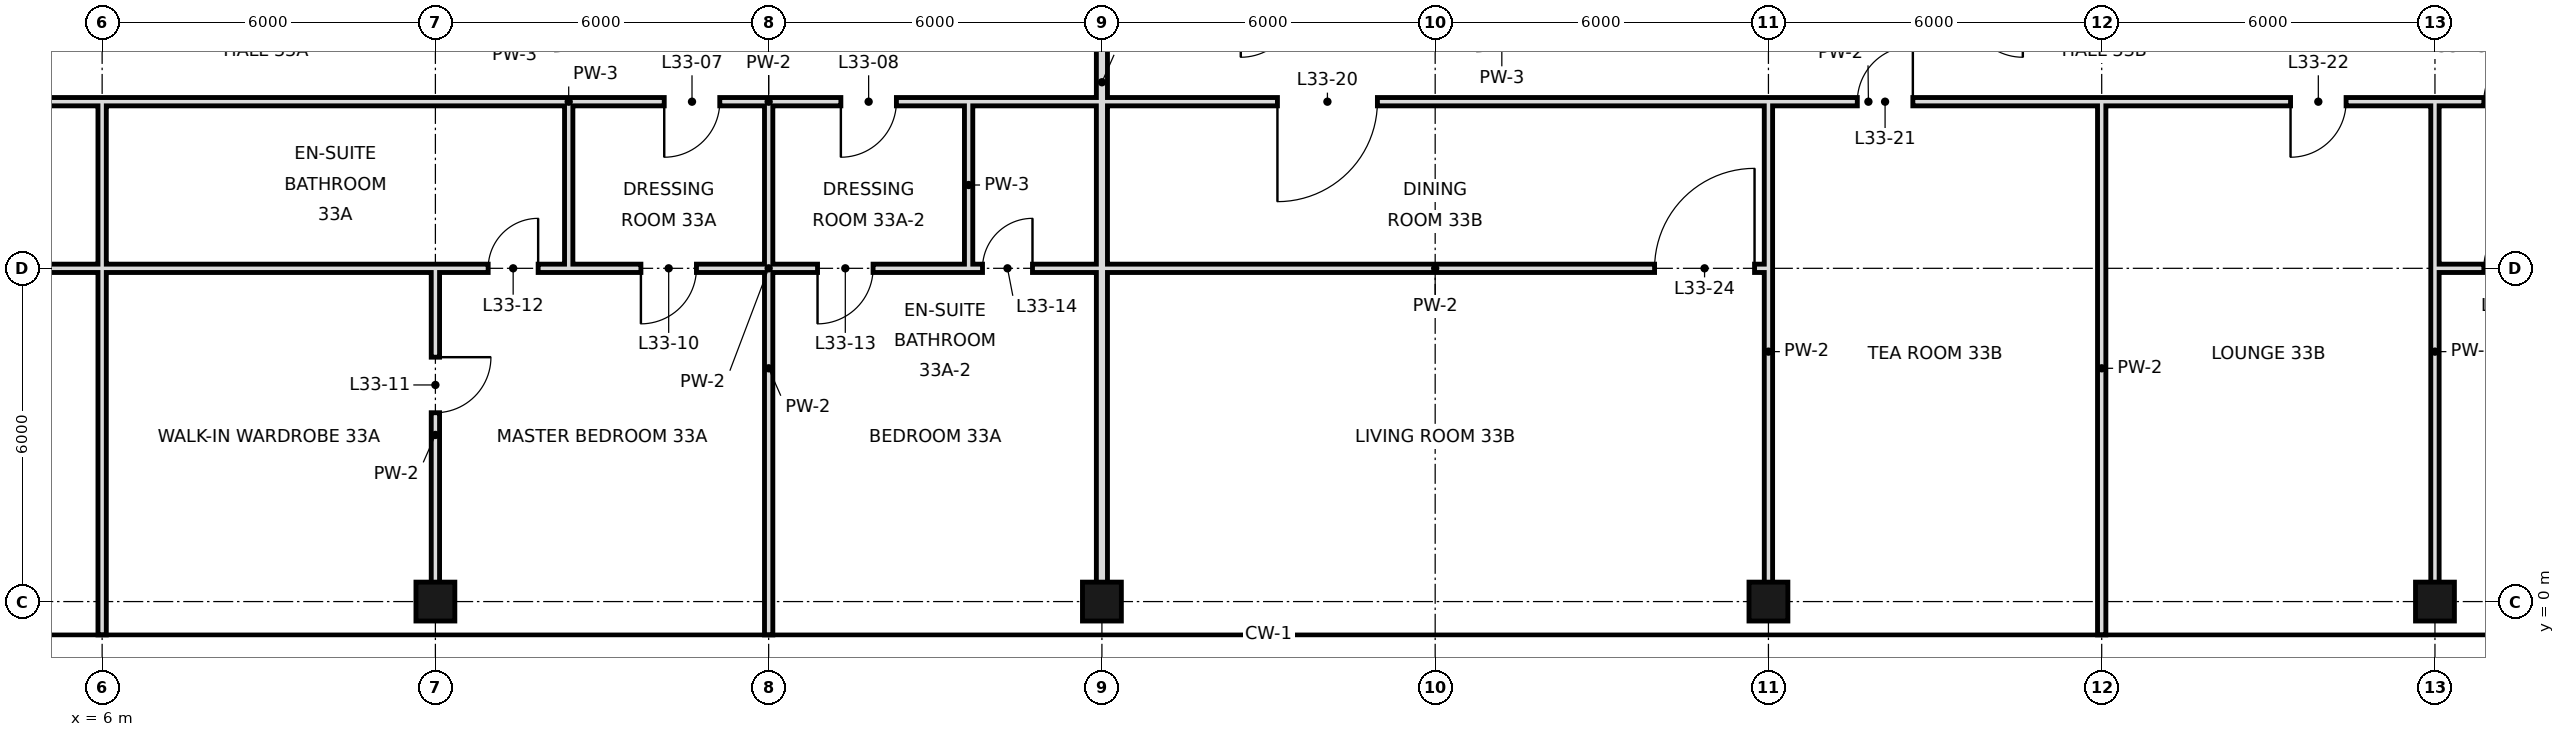
"""IFC4 building model, lengths in metres.
Left out: names, types, materials, properties, quantities, classifications, styles, units other than length and angle.
Written with IfcOpenShell. Run it as: python <this file> out.ifc"""

import sys

from ifc_helpers import new_model, si_unit, direction, frame, frame_2d, origin, origin_2d, place, context, subcontext, project, spatial, rectangle, hollow_rectangle, extrude, element, fill, save


model = new_model("IFC4")
c1 = context("Model", 3, precision=1e-05, world=origin(), true_north=direction((0.0, 1.0)))
c2 = subcontext(c1, "Body", "Model", "MODEL_VIEW")
j1 = project(units=[si_unit("LENGTHUNIT", "METRE"), si_unit("PLANEANGLEUNIT", "RADIAN")], contexts=[c1])
p1 = place(None, origin())
s1 = spatial("IfcSite", under=j1, at=p1, CompositionType="ELEMENT")
p2 = place(p1, origin())
s2 = spatial("IfcBuilding", under=s1, at=p2, CompositionType="ELEMENT")
p3 = place(p2, frame((0.0, 0.0, 147.4)))
s3 = spatial("IfcBuildingStorey", under=s2, at=p3, CompositionType="ELEMENT", Elevation=147.4)
for number, where, z_axis, x_axis in (
    (1, (12.0, 0.0, 0.0), (0.0, 0.0, 1.0), (1.0, 0.0, 0.0)),
    (2, (24.0, 0.0, 0.0), (0.0, 0.0, 1.0), (1.0, 0.0, 0.0)),
    (3, (36.0, 0.0, 0.0), (0.0, 0.0, 1.0), (1.0, 0.0, 0.0)),
    (4, (48.0, 0.0, 0.0), (0.0, 0.0, 1.0), (1.0, 0.0, 0.0)),
):
    element("IfcColumn", number, at=place(p3, frame(where, z_axis=z_axis, x_axis=x_axis)), inside=s3, PredefinedType="COLUMN", context=c2, shape_type="SweptSolid", body=[
        extrude(hollow_rectangle(XDim=0.7, YDim=0.7, WallThickness=0.036, at=origin_2d()), origin(), (0.0, 0.0, 1.0), 3.6),
    ])
p4 = place(p3, frame((12.0, 0.0, 0.0), z_axis=(0.0, 0.0, 1.0), x_axis=(0.0, 1.0, 0.0)))
e5 = element("IfcWall", 5, at=p4, inside=s3, PredefinedType="PARTITIONING", context=c2, shape_type="SweptSolid", body=[
    extrude(rectangle(XDim=6.0, YDim=0.15, at=frame_2d((3.0, 0.0))), origin(), (0.0, 0.0, 1.0), 2.72),
])
p5 = place(p4, frame((3.4, 0.0, 0.0)))
e6 = element("IfcOpeningElement", 6, at=p5, cuts=e5, PredefinedType="OPENING", context=c2, shape_type="SweptSolid", body=[
    extrude(rectangle(XDim=1.0, YDim=2.4, at=frame_2d((0.5, 1.2))), frame((0.0, 0.085, 0.0), z_axis=(0.0, -1.0, 0.0), x_axis=(1.0, 0.0, 0.0)), (0.0, 0.0, 1.0), 0.17),
])
p6 = place(p3, frame((14.4, 6.0, 0.0), z_axis=(0.0, 0.0, 1.0), x_axis=(0.0, 1.0, 0.0)))
e7 = element("IfcWall", 7, at=p6, inside=s3, PredefinedType="PARTITIONING", context=c2, shape_type="SweptSolid", body=[
    extrude(rectangle(XDim=3.0, YDim=0.15, at=frame_2d((1.5, 0.0))), origin(), (0.0, 0.0, 1.0), 3.42),
])
p7 = place(p3, frame((18.0, -0.6, 0.0), z_axis=(0.0, 0.0, 1.0), x_axis=(0.0, 1.0, 0.0)))
e8 = element("IfcWall", 8, at=p7, inside=s3, PredefinedType="PARTITIONING", context=c2, shape_type="SweptSolid", body=[
    extrude(rectangle(XDim=9.6, YDim=0.15, at=frame_2d((4.8, 0.0))), origin(), (0.0, 0.0, 1.0), 2.72),
])
p8 = place(p3, frame((21.6, 6.0, 0.0), z_axis=(0.0, 0.0, 1.0), x_axis=(0.0, 1.0, 0.0)))
e9 = element("IfcWall", 9, at=p8, inside=s3, PredefinedType="PARTITIONING", context=c2, shape_type="SweptSolid", body=[
    extrude(rectangle(XDim=3.0, YDim=0.15, at=frame_2d((1.5, 0.0))), origin(), (0.0, 0.0, 1.0), 3.42),
])
p9 = place(p3, frame((24.0, 0.0, 0.0), z_axis=(0.0, 0.0, 1.0), x_axis=(0.0, 1.0, 0.0)))
e10 = element("IfcWall", 10, at=p9, inside=s3, PredefinedType="SOLIDWALL", context=c2, shape_type="SweptSolid", body=[
    extrude(rectangle(XDim=18.7, YDim=0.2, at=frame_2d((9.35, 0.0))), origin(), (0.0, 0.0, 1.0), 2.72),
])
p10 = place(p3, frame((36.0, 0.0, 0.0), z_axis=(0.0, 0.0, 1.0), x_axis=(0.0, 1.0, 0.0)))
e11 = element("IfcWall", 11, at=p10, inside=s3, PredefinedType="PARTITIONING", context=c2, shape_type="SweptSolid", body=[
    extrude(rectangle(XDim=9.0, YDim=0.15, at=frame_2d((4.5, 0.0))), origin(), (0.0, 0.0, 1.0), 2.72),
])
p11 = place(p3, frame((42.0, -0.6, 0.0), z_axis=(0.0, 0.0, 1.0), x_axis=(0.0, 1.0, 0.0)))
e12 = element("IfcWall", 12, at=p11, inside=s3, PredefinedType="PARTITIONING", context=c2, shape_type="SweptSolid", body=[
    extrude(rectangle(XDim=9.6, YDim=0.15, at=frame_2d((4.8, 0.0))), origin(), (0.0, 0.0, 1.0), 2.72),
])
p12 = place(p3, frame((48.0, 0.0, 0.0), z_axis=(0.0, 0.0, 1.0), x_axis=(0.0, 1.0, 0.0)))
e13 = element("IfcWall", 13, at=p12, inside=s3, PredefinedType="PARTITIONING", context=c2, shape_type="SweptSolid", body=[
    extrude(rectangle(XDim=9.0, YDim=0.15, at=frame_2d((4.5, 0.0))), origin(), (0.0, 0.0, 1.0), 2.72),
])
p13 = place(p3, frame((6.0, -0.6, 0.0), z_axis=(0.0, 0.0, 1.0), x_axis=(0.0, 1.0, 0.0)))
e14 = element("IfcWall", 14, at=p13, inside=s3, PredefinedType="PARTITIONING", context=c2, shape_type="SweptSolid", body=[
    extrude(rectangle(XDim=6.6, YDim=0.15, at=frame_2d((3.3, 0.0))), origin(), (0.0, 0.0, 1.0), 2.72),
])
p14 = place(p3, frame((6.0, 6.0, 0.0), z_axis=(0.0, 0.0, 1.0), x_axis=(0.0, 1.0, 0.0)))
e15 = element("IfcWall", 15, at=p14, inside=s3, PredefinedType="PARTITIONING", context=c2, shape_type="SweptSolid", body=[
    extrude(rectangle(XDim=3.0, YDim=0.15, at=frame_2d((1.5, 0.0))), origin(), (0.0, 0.0, 1.0), 2.72),
])
p15 = place(p3, frame((-6.0, 6.0, 0.0), z_axis=(0.0, 0.0, 1.0), x_axis=(1.0, 0.0, 0.0)))
e16 = element("IfcWall", 16, at=p15, inside=s3, PredefinedType="PARTITIONING", context=c2, shape_type="SweptSolid", body=[
    extrude(rectangle(XDim=12.0, YDim=0.15, at=frame_2d((6.0, 0.0))), origin(), (0.0, 0.0, 1.0), 2.97),
])
p16 = place(p15, frame((7.04, 0.0, 0.0)))
e17 = element("IfcOpeningElement", 17, at=p16, cuts=e16, PredefinedType="OPENING", context=c2, shape_type="SweptSolid", body=[
    extrude(rectangle(XDim=1.8, YDim=2.4, at=frame_2d((0.9, 1.2))), frame((0.0, 0.085, 0.0), z_axis=(0.0, -1.0, 0.0), x_axis=(1.0, 0.0, 0.0)), (0.0, 0.0, 1.0), 0.17),
])
p17 = place(p3, frame((14.4, 6.0, 0.0), z_axis=(0.0, 0.0, 1.0), x_axis=(1.0, 0.0, 0.0)))
e18 = element("IfcWall", 18, at=p17, inside=s3, PredefinedType="PARTITIONING", context=c2, shape_type="SweptSolid", body=[
    extrude(rectangle(XDim=7.2, YDim=0.15, at=frame_2d((3.6, 0.0))), origin(), (0.0, 0.0, 1.0), 2.97),
])
p18 = place(p17, frame((1.3, 0.0, 0.0)))
e19 = element("IfcOpeningElement", 19, at=p18, cuts=e18, PredefinedType="OPENING", context=c2, shape_type="SweptSolid", body=[
    extrude(rectangle(XDim=1.0, YDim=2.4, at=frame_2d((0.5, 1.2))), frame((0.0, 0.085, 0.0), z_axis=(0.0, -1.0, 0.0), x_axis=(1.0, 0.0, 0.0)), (0.0, 0.0, 1.0), 0.17),
])
p19 = place(p17, frame((4.48, 0.0, 0.0)))
e20 = element("IfcOpeningElement", 20, at=p19, cuts=e18, PredefinedType="OPENING", context=c2, shape_type="SweptSolid", body=[
    extrude(rectangle(XDim=1.0, YDim=2.4, at=frame_2d((0.5, 1.2))), frame((0.0, 0.085, 0.0), z_axis=(0.0, -1.0, 0.0), x_axis=(1.0, 0.0, 0.0)), (0.0, 0.0, 1.0), 0.17),
])
p20 = place(p3, frame((24.0, 6.0, 0.0), z_axis=(0.0, 0.0, 1.0), x_axis=(1.0, 0.0, 0.0)))
e21 = element("IfcWall", 21, at=p20, inside=s3, PredefinedType="PARTITIONING", context=c2, shape_type="SweptSolid", body=[
    extrude(rectangle(XDim=12.0, YDim=0.15, at=frame_2d((6.0, 0.0))), origin(), (0.0, 0.0, 1.0), 2.97),
])
p21 = place(p20, frame((9.95, 0.0, 0.0)))
e22 = element("IfcOpeningElement", 22, at=p21, cuts=e21, PredefinedType="OPENING", context=c2, shape_type="SweptSolid", body=[
    extrude(rectangle(XDim=1.8, YDim=2.4, at=frame_2d((0.9, 1.2))), frame((0.0, 0.085, 0.0), z_axis=(0.0, -1.0, 0.0), x_axis=(1.0, 0.0, 0.0)), (0.0, 0.0, 1.0), 0.17),
])
p22 = place(p3, frame((48.0, 6.0, 0.0), z_axis=(0.0, 0.0, 1.0), x_axis=(1.0, 0.0, 0.0)))
e23 = element("IfcWall", 23, at=p22, inside=s3, PredefinedType="PARTITIONING", context=c2, shape_type="SweptSolid", body=[
    extrude(rectangle(XDim=3.6, YDim=0.15, at=frame_2d((1.8, 0.0))), origin(), (0.0, 0.0, 1.0), 2.72),
])
p23 = place(p22, frame((0.88, 0.0, 0.0)))
e24 = element("IfcOpeningElement", 24, at=p23, cuts=e23, PredefinedType="OPENING", context=c2, shape_type="SweptSolid", body=[
    extrude(rectangle(XDim=1.0, YDim=2.4, at=frame_2d((0.5, 1.2))), frame((0.0, 0.085, 0.0), z_axis=(0.0, -1.0, 0.0), x_axis=(1.0, 0.0, 0.0)), (0.0, 0.0, 1.0), 0.17),
])
p24 = place(p3, frame((6.0, 6.0, 0.0), z_axis=(0.0, 0.0, 1.0), x_axis=(1.0, 0.0, 0.0)))
e25 = element("IfcWall", 25, at=p24, inside=s3, PredefinedType="PARTITIONING", context=c2, shape_type="SweptSolid", body=[
    extrude(rectangle(XDim=8.4, YDim=0.15, at=frame_2d((4.2, 0.0))), origin(), (0.0, 0.0, 1.0), 2.97),
])
p25 = place(p24, frame((6.95, 0.0, 0.0)))
e26 = element("IfcOpeningElement", 26, at=p25, cuts=e25, PredefinedType="OPENING", context=c2, shape_type="SweptSolid", body=[
    extrude(rectangle(XDim=0.9, YDim=2.4, at=frame_2d((0.45, 1.2))), frame((0.0, 0.085, 0.0), z_axis=(0.0, -1.0, 0.0), x_axis=(1.0, 0.0, 0.0)), (0.0, 0.0, 1.0), 0.17),
])
p26 = place(p3, frame((21.6, 6.0, 0.0), z_axis=(0.0, 0.0, 1.0), x_axis=(1.0, 0.0, 0.0)))
e27 = element("IfcWall", 27, at=p26, inside=s3, PredefinedType="PARTITIONING", context=c2, shape_type="SweptSolid", body=[
    extrude(rectangle(XDim=2.4, YDim=0.15, at=frame_2d((1.2, 0.0))), origin(), (0.0, 0.0, 1.0), 2.97),
])
p27 = place(p26, frame((0.25, 0.0, 0.0)))
e28 = element("IfcOpeningElement", 28, at=p27, cuts=e27, PredefinedType="OPENING", context=c2, shape_type="SweptSolid", body=[
    extrude(rectangle(XDim=0.9, YDim=2.4, at=frame_2d((0.45, 1.2))), frame((0.0, 0.085, 0.0), z_axis=(0.0, -1.0, 0.0), x_axis=(1.0, 0.0, 0.0)), (0.0, 0.0, 1.0), 0.17),
])
p28 = place(p3, frame((-6.6, 9.0, 0.0), z_axis=(0.0, 0.0, 1.0), x_axis=(1.0, 0.0, 0.0)))
e29 = element("IfcWall", 29, at=p28, inside=s3, PredefinedType="PARTITIONING", context=c2, shape_type="SweptSolid", body=[
    extrude(rectangle(XDim=12.6, YDim=0.15, at=frame_2d((6.3, 0.0))), origin(), (0.0, 0.0, 1.0), 3.42),
])
p29 = place(p28, frame((7.64, 0.0, 0.0)))
e30 = element("IfcOpeningElement", 30, at=p29, cuts=e29, PredefinedType="OPENING", context=c2, shape_type="SweptSolid", body=[
    extrude(rectangle(XDim=1.8, YDim=2.4, at=frame_2d((0.9, 1.2))), frame((0.0, 0.085, 0.0), z_axis=(0.0, -1.0, 0.0), x_axis=(1.0, 0.0, 0.0)), (0.0, 0.0, 1.0), 0.17),
])
p30 = place(p3, frame((14.4, 9.0, 0.0), z_axis=(0.0, 0.0, 1.0), x_axis=(1.0, 0.0, 0.0)))
e31 = element("IfcWall", 31, at=p30, inside=s3, PredefinedType="PARTITIONING", context=c2, shape_type="SweptSolid", body=[
    extrude(rectangle(XDim=7.2, YDim=0.15, at=frame_2d((3.6, 0.0))), origin(), (0.0, 0.0, 1.0), 3.42),
])
p31 = place(p30, frame((1.72, 0.0, 0.0)))
e32 = element("IfcOpeningElement", 32, at=p31, cuts=e31, PredefinedType="OPENING", context=c2, shape_type="SweptSolid", body=[
    extrude(rectangle(XDim=1.0, YDim=2.4, at=frame_2d((0.5, 1.2))), frame((0.0, 0.085, 0.0), z_axis=(0.0, -1.0, 0.0), x_axis=(1.0, 0.0, 0.0)), (0.0, 0.0, 1.0), 0.17),
])
p32 = place(p30, frame((4.9, 0.0, 0.0)))
e33 = element("IfcOpeningElement", 33, at=p32, cuts=e31, PredefinedType="OPENING", context=c2, shape_type="SweptSolid", body=[
    extrude(rectangle(XDim=1.0, YDim=2.4, at=frame_2d((0.5, 1.2))), frame((0.0, 0.085, 0.0), z_axis=(0.0, -1.0, 0.0), x_axis=(1.0, 0.0, 0.0)), (0.0, 0.0, 1.0), 0.17),
])
p33 = place(p3, frame((24.0, 9.0, 0.0), z_axis=(0.0, 0.0, 1.0), x_axis=(1.0, 0.0, 0.0)))
e34 = element("IfcWall", 34, at=p33, inside=s3, PredefinedType="PARTITIONING", context=c2, shape_type="SweptSolid", body=[
    extrude(rectangle(XDim=27.6, YDim=0.15, at=frame_2d((13.8, 0.0))), origin(), (0.0, 0.0, 1.0), 3.42),
])
p34 = place(p33, frame((3.16, 0.0, 0.0)))
e35 = element("IfcOpeningElement", 35, at=p34, cuts=e34, PredefinedType="OPENING", context=c2, shape_type="SweptSolid", body=[
    extrude(rectangle(XDim=1.8, YDim=2.4, at=frame_2d((0.9, 1.2))), frame((0.0, 0.085, 0.0), z_axis=(0.0, -1.0, 0.0), x_axis=(1.0, 0.0, 0.0)), (0.0, 0.0, 1.0), 0.17),
])
p35 = place(p33, frame((13.6, 0.0, 0.0)))
e36 = element("IfcOpeningElement", 36, at=p35, cuts=e34, PredefinedType="OPENING", context=c2, shape_type="SweptSolid", body=[
    extrude(rectangle(XDim=1.0, YDim=2.4, at=frame_2d((0.5, 1.2))), frame((0.0, 0.085, 0.0), z_axis=(0.0, -1.0, 0.0), x_axis=(1.0, 0.0, 0.0)), (0.0, 0.0, 1.0), 0.17),
])
p36 = place(p33, frame((21.4, 0.0, 0.0)))
e37 = element("IfcOpeningElement", 37, at=p36, cuts=e34, PredefinedType="OPENING", context=c2, shape_type="SweptSolid", body=[
    extrude(rectangle(XDim=1.0, YDim=2.4, at=frame_2d((0.5, 1.2))), frame((0.0, 0.085, 0.0), z_axis=(0.0, -1.0, 0.0), x_axis=(1.0, 0.0, 0.0)), (0.0, 0.0, 1.0), 0.17),
])
p37 = place(p33, frame((24.88, 0.0, 0.0)))
e38 = element("IfcOpeningElement", 38, at=p37, cuts=e34, PredefinedType="OPENING", context=c2, shape_type="SweptSolid", body=[
    extrude(rectangle(XDim=1.0, YDim=2.4, at=frame_2d((0.5, 1.2))), frame((0.0, 0.085, 0.0), z_axis=(0.0, -1.0, 0.0), x_axis=(1.0, 0.0, 0.0)), (0.0, 0.0, 1.0), 0.17),
])
p38 = place(p3, frame((6.0, 9.0, 0.0), z_axis=(0.0, 0.0, 1.0), x_axis=(1.0, 0.0, 0.0)))
e39 = element("IfcWall", 39, at=p38, inside=s3, PredefinedType="PARTITIONING", context=c2, shape_type="SweptSolid", body=[
    extrude(rectangle(XDim=8.4, YDim=0.15, at=frame_2d((4.2, 0.0))), origin(), (0.0, 0.0, 1.0), 3.42),
])
p39 = place(p3, frame((21.6, 9.0, 0.0), z_axis=(0.0, 0.0, 1.0), x_axis=(1.0, 0.0, 0.0)))
e40 = element("IfcWall", 40, at=p39, inside=s3, PredefinedType="PARTITIONING", context=c2, shape_type="SweptSolid", body=[
    extrude(rectangle(XDim=2.4, YDim=0.15, at=frame_2d((1.2, 0.0))), origin(), (0.0, 0.0, 1.0), 3.42),
])
p40 = place(p31, frame((1.0, 0.0, 0.0), z_axis=(0.0, 0.0, 1.0), x_axis=(-1.0, 0.0, 0.0)))
e41 = element("IfcDoor", 41, at=p40, inside=s3, OperationType="SINGLE_SWING_RIGHT", PredefinedType="DOOR", context=c2, shape_type="SweptSolid", body=[
    extrude(rectangle(XDim=1.0, YDim=2.4, at=frame_2d((0.5, 1.2))), frame((0.0, 0.025, 0.0), z_axis=(0.0, -1.0, 0.0), x_axis=(1.0, 0.0, 0.0)), (0.0, 0.0, 1.0), 0.05),
])
fill(e32, e41)
p41 = place(p32, frame((1.0, 0.0, 0.0), z_axis=(0.0, 0.0, 1.0), x_axis=(-1.0, 0.0, 0.0)))
e42 = element("IfcDoor", 42, at=p41, inside=s3, OperationType="SINGLE_SWING_RIGHT", PredefinedType="DOOR", context=c2, shape_type="SweptSolid", body=[
    extrude(rectangle(XDim=1.0, YDim=2.4, at=frame_2d((0.5, 1.2))), frame((0.0, 0.025, 0.0), z_axis=(0.0, -1.0, 0.0), x_axis=(1.0, 0.0, 0.0)), (0.0, 0.0, 1.0), 0.05),
])
fill(e33, e42)
p42 = place(p18, frame((1.0, 0.0, 0.0), z_axis=(0.0, 0.0, 1.0), x_axis=(-1.0, 0.0, 0.0)))
e43 = element("IfcDoor", 43, at=p42, inside=s3, OperationType="SINGLE_SWING_RIGHT", PredefinedType="DOOR", context=c2, shape_type="SweptSolid", body=[
    extrude(rectangle(XDim=1.0, YDim=2.4, at=frame_2d((0.5, 1.2))), frame((0.0, 0.025, 0.0), z_axis=(0.0, -1.0, 0.0), x_axis=(1.0, 0.0, 0.0)), (0.0, 0.0, 1.0), 0.05),
])
fill(e19, e43)
p43 = place(p5, origin())
e44 = element("IfcDoor", 44, at=p43, inside=s3, OperationType="SINGLE_SWING_RIGHT", PredefinedType="DOOR", context=c2, shape_type="SweptSolid", body=[
    extrude(rectangle(XDim=1.0, YDim=2.4, at=frame_2d((0.5, 1.2))), frame((0.0, 0.025, 0.0), z_axis=(0.0, -1.0, 0.0), x_axis=(1.0, 0.0, 0.0)), (0.0, 0.0, 1.0), 0.05),
])
fill(e6, e44)
p44 = place(p25, frame((0.9, 0.0, 0.0), z_axis=(0.0, 0.0, 1.0), x_axis=(-1.0, 0.0, 0.0)))
e45 = element("IfcDoor", 45, at=p44, inside=s3, OperationType="SINGLE_SWING_LEFT", PredefinedType="DOOR", context=c2, shape_type="SweptSolid", body=[
    extrude(rectangle(XDim=0.9, YDim=2.4, at=frame_2d((0.45, 1.2))), frame((0.0, 0.025, 0.0), z_axis=(0.0, -1.0, 0.0), x_axis=(1.0, 0.0, 0.0)), (0.0, 0.0, 1.0), 0.05),
])
fill(e26, e45)
p45 = place(p19, frame((1.0, 0.0, 0.0), z_axis=(0.0, 0.0, 1.0), x_axis=(-1.0, 0.0, 0.0)))
e46 = element("IfcDoor", 46, at=p45, inside=s3, OperationType="SINGLE_SWING_RIGHT", PredefinedType="DOOR", context=c2, shape_type="SweptSolid", body=[
    extrude(rectangle(XDim=1.0, YDim=2.4, at=frame_2d((0.5, 1.2))), frame((0.0, 0.025, 0.0), z_axis=(0.0, -1.0, 0.0), x_axis=(1.0, 0.0, 0.0)), (0.0, 0.0, 1.0), 0.05),
])
fill(e20, e46)
p46 = place(p27, frame((0.9, 0.0, 0.0), z_axis=(0.0, 0.0, 1.0), x_axis=(-1.0, 0.0, 0.0)))
e47 = element("IfcDoor", 47, at=p46, inside=s3, OperationType="SINGLE_SWING_LEFT", PredefinedType="DOOR", context=c2, shape_type="SweptSolid", body=[
    extrude(rectangle(XDim=0.9, YDim=2.4, at=frame_2d((0.45, 1.2))), frame((0.0, 0.025, 0.0), z_axis=(0.0, -1.0, 0.0), x_axis=(1.0, 0.0, 0.0)), (0.0, 0.0, 1.0), 0.05),
])
fill(e28, e47)
p47 = place(p34, frame((1.8, 0.0, 0.0), z_axis=(0.0, 0.0, 1.0), x_axis=(-1.0, 0.0, 0.0)))
e48 = element("IfcDoor", 48, at=p47, inside=s3, OperationType="SINGLE_SWING_RIGHT", PredefinedType="DOOR", context=c2, shape_type="SweptSolid", body=[
    extrude(rectangle(XDim=1.8, YDim=2.4, at=frame_2d((0.9, 1.2))), frame((0.0, 0.025, 0.0), z_axis=(0.0, -1.0, 0.0), x_axis=(1.0, 0.0, 0.0)), (0.0, 0.0, 1.0), 0.05),
])
fill(e35, e48)
p48 = place(p35, frame((1.0, 0.0, 0.0), z_axis=(0.0, 0.0, 1.0), x_axis=(-1.0, 0.0, 0.0)))
e49 = element("IfcDoor", 49, at=p48, inside=s3, OperationType="SINGLE_SWING_LEFT", PredefinedType="DOOR", context=c2, shape_type="SweptSolid", body=[
    extrude(rectangle(XDim=1.0, YDim=2.4, at=frame_2d((0.5, 1.2))), frame((0.0, 0.025, 0.0), z_axis=(0.0, -1.0, 0.0), x_axis=(1.0, 0.0, 0.0)), (0.0, 0.0, 1.0), 0.05),
])
fill(e36, e49)
p49 = place(p36, frame((1.0, 0.0, 0.0), z_axis=(0.0, 0.0, 1.0), x_axis=(-1.0, 0.0, 0.0)))
e50 = element("IfcDoor", 50, at=p49, inside=s3, OperationType="SINGLE_SWING_RIGHT", PredefinedType="DOOR", context=c2, shape_type="SweptSolid", body=[
    extrude(rectangle(XDim=1.0, YDim=2.4, at=frame_2d((0.5, 1.2))), frame((0.0, 0.025, 0.0), z_axis=(0.0, -1.0, 0.0), x_axis=(1.0, 0.0, 0.0)), (0.0, 0.0, 1.0), 0.05),
])
fill(e37, e50)
p50 = place(p37, frame((1.0, 0.0, 0.0), z_axis=(0.0, 0.0, 1.0), x_axis=(-1.0, 0.0, 0.0)))
e51 = element("IfcDoor", 51, at=p50, inside=s3, OperationType="SINGLE_SWING_LEFT", PredefinedType="DOOR", context=c2, shape_type="SweptSolid", body=[
    extrude(rectangle(XDim=1.0, YDim=2.4, at=frame_2d((0.5, 1.2))), frame((0.0, 0.025, 0.0), z_axis=(0.0, -1.0, 0.0), x_axis=(1.0, 0.0, 0.0)), (0.0, 0.0, 1.0), 0.05),
])
fill(e38, e51)
p51 = place(p21, frame((1.8, 0.0, 0.0), z_axis=(0.0, 0.0, 1.0), x_axis=(-1.0, 0.0, 0.0)))
e52 = element("IfcDoor", 52, at=p51, inside=s3, OperationType="SINGLE_SWING_LEFT", PredefinedType="DOOR", context=c2, shape_type="SweptSolid", body=[
    extrude(rectangle(XDim=1.8, YDim=2.4, at=frame_2d((0.9, 1.2))), frame((0.0, 0.025, 0.0), z_axis=(0.0, -1.0, 0.0), x_axis=(1.0, 0.0, 0.0)), (0.0, 0.0, 1.0), 0.05),
])
fill(e22, e52)
p52 = place(p23, frame((1.0, 0.0, 0.0), z_axis=(0.0, 0.0, 1.0), x_axis=(-1.0, 0.0, 0.0)))
e53 = element("IfcDoor", 53, at=p52, inside=s3, OperationType="SINGLE_SWING_LEFT", PredefinedType="DOOR", context=c2, shape_type="SweptSolid", body=[
    extrude(rectangle(XDim=1.0, YDim=2.4, at=frame_2d((0.5, 1.2))), frame((0.0, 0.025, 0.0), z_axis=(0.0, -1.0, 0.0), x_axis=(1.0, 0.0, 0.0)), (0.0, 0.0, 1.0), 0.05),
])
fill(e24, e53)
save(model, sys.argv[1])
